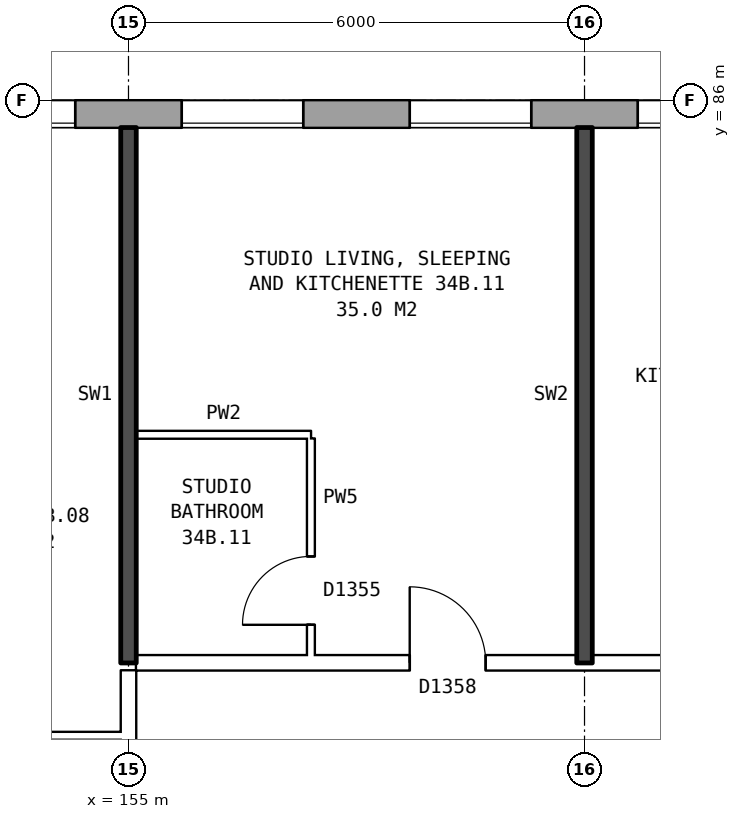
"""IFC4 building model, lengths in metres.
Left out: names, types, materials, properties, quantities, classifications, styles, units other than length and angle.
Written with IfcOpenShell. Run it as: python <this file> out.ifc"""

import sys

from ifc_helpers import new_model, si_unit, direction, frame, frame_2d, origin, place, context, subcontext, project, spatial, rectangle, extrude, element, fill, save


model = new_model("IFC4")
c1 = context("Model", 3, precision=1e-05, world=origin(), true_north=direction((0.0, 1.0)))
c2 = subcontext(c1, "Body", "Model", "MODEL_VIEW")
j1 = project(units=[si_unit("LENGTHUNIT", "METRE"), si_unit("PLANEANGLEUNIT", "RADIAN")], contexts=[c1])
p1 = place(None, origin())
s1 = spatial("IfcSite", under=j1, at=p1, CompositionType="ELEMENT")
p2 = place(p1, origin())
s2 = spatial("IfcBuilding", under=s1, at=p2, CompositionType="ELEMENT")
p3 = place(p2, frame((0.0, 0.0, 123.7)))
s3 = spatial("IfcBuildingStorey", under=s2, at=p3, CompositionType="ELEMENT", Elevation=123.7)
p4 = place(p3, frame((169.675, 85.82, 0.0), z_axis=(0.0, 0.0, 1.0), x_axis=(-1.0, 0.0, 0.0)))
e1 = element("IfcWall", 1, at=p4, inside=s3, PredefinedType="STANDARD", context=c2, shape_type="SweptSolid", body=[
    extrude(rectangle(XDim=35.601, YDim=0.36, at=frame_2d((17.8, 0.0))), origin(), (0.0, 0.0, 1.0), 2.85),
])
p5 = place(p4, frame((0.3, 0.0, 0.8)))
e2 = element("IfcOpeningElement", 2, at=p5, cuts=e1, PredefinedType="OPENING", context=c2, shape_type="SweptSolid", body=[
    extrude(rectangle(XDim=0.8, YDim=1.8, at=frame_2d((0.4, 0.9))), frame((0.0, 0.19, 0.0), z_axis=(0.0, -1.0, 0.0), x_axis=(1.0, 0.0, 0.0)), (0.0, 0.0, 1.0), 0.38),
])
p6 = place(p4, frame((3.125, 0.0, 0.8)))
e3 = element("IfcOpeningElement", 3, at=p6, cuts=e1, PredefinedType="OPENING", context=c2, shape_type="SweptSolid", body=[
    extrude(rectangle(XDim=0.8, YDim=0.9, at=frame_2d((0.4, 0.45))), frame((0.0, 0.19, 0.0), z_axis=(0.0, -1.0, 0.0), x_axis=(1.0, 0.0, 0.0)), (0.0, 0.0, 1.0), 0.38),
])
p7 = place(p4, frame((6.375, 0.0, 0.8)))
e4 = element("IfcOpeningElement", 4, at=p7, cuts=e1, PredefinedType="OPENING", context=c2, shape_type="SweptSolid", body=[
    extrude(rectangle(XDim=1.6, YDim=1.8, at=frame_2d((0.8, 0.9))), frame((0.0, 0.19, 0.0), z_axis=(0.0, -1.0, 0.0), x_axis=(1.0, 0.0, 0.0)), (0.0, 0.0, 1.0), 0.38),
])
p8 = place(p4, frame((9.375, 0.0, 0.8)))
e5 = element("IfcOpeningElement", 5, at=p8, cuts=e1, PredefinedType="OPENING", context=c2, shape_type="SweptSolid", body=[
    extrude(rectangle(XDim=1.6, YDim=1.8, at=frame_2d((0.8, 0.9))), frame((0.0, 0.19, 0.0), z_axis=(0.0, -1.0, 0.0), x_axis=(1.0, 0.0, 0.0)), (0.0, 0.0, 1.0), 0.38),
])
p9 = place(p4, frame((12.375, 0.0, 0.8)))
e6 = element("IfcOpeningElement", 6, at=p9, cuts=e1, PredefinedType="OPENING", context=c2, shape_type="SweptSolid", body=[
    extrude(rectangle(XDim=1.6, YDim=1.8, at=frame_2d((0.8, 0.9))), frame((0.0, 0.19, 0.0), z_axis=(0.0, -1.0, 0.0), x_axis=(1.0, 0.0, 0.0)), (0.0, 0.0, 1.0), 0.38),
])
p10 = place(p4, frame((15.375, 0.0, 0.8)))
e7 = element("IfcOpeningElement", 7, at=p10, cuts=e1, PredefinedType="OPENING", context=c2, shape_type="SweptSolid", body=[
    extrude(rectangle(XDim=1.6, YDim=1.8, at=frame_2d((0.8, 0.9))), frame((0.0, 0.19, 0.0), z_axis=(0.0, -1.0, 0.0), x_axis=(1.0, 0.0, 0.0)), (0.0, 0.0, 1.0), 0.38),
])
p11 = place(p4, frame((18.375, 0.0, 0.8)))
e8 = element("IfcOpeningElement", 8, at=p11, cuts=e1, PredefinedType="OPENING", context=c2, shape_type="SweptSolid", body=[
    extrude(rectangle(XDim=1.6, YDim=1.8, at=frame_2d((0.8, 0.9))), frame((0.0, 0.19, 0.0), z_axis=(0.0, -1.0, 0.0), x_axis=(1.0, 0.0, 0.0)), (0.0, 0.0, 1.0), 0.38),
])
p12 = place(p4, frame((21.375, 0.0, 0.8)))
e9 = element("IfcOpeningElement", 9, at=p12, cuts=e1, PredefinedType="OPENING", context=c2, shape_type="SweptSolid", body=[
    extrude(rectangle(XDim=1.6, YDim=1.8, at=frame_2d((0.8, 0.9))), frame((0.0, 0.19, 0.0), z_axis=(0.0, -1.0, 0.0), x_axis=(1.0, 0.0, 0.0)), (0.0, 0.0, 1.0), 0.38),
])
p13 = place(p4, frame((24.375, 0.0, 0.8)))
e10 = element("IfcOpeningElement", 10, at=p13, cuts=e1, PredefinedType="OPENING", context=c2, shape_type="SweptSolid", body=[
    extrude(rectangle(XDim=1.6, YDim=1.8, at=frame_2d((0.8, 0.9))), frame((0.0, 0.19, 0.0), z_axis=(0.0, -1.0, 0.0), x_axis=(1.0, 0.0, 0.0)), (0.0, 0.0, 1.0), 0.38),
])
p14 = place(p4, frame((27.375, 0.0, 0.8)))
e11 = element("IfcOpeningElement", 11, at=p14, cuts=e1, PredefinedType="OPENING", context=c2, shape_type="SweptSolid", body=[
    extrude(rectangle(XDim=1.6, YDim=1.8, at=frame_2d((0.8, 0.9))), frame((0.0, 0.19, 0.0), z_axis=(0.0, -1.0, 0.0), x_axis=(1.0, 0.0, 0.0)), (0.0, 0.0, 1.0), 0.38),
])
p15 = place(p4, frame((29.275, 0.0, 0.8)))
e12 = element("IfcOpeningElement", 12, at=p15, cuts=e1, PredefinedType="OPENING", context=c2, shape_type="SweptSolid", body=[
    extrude(rectangle(XDim=1.4, YDim=1.8, at=frame_2d((0.7, 0.9))), frame((0.0, 0.19, 0.0), z_axis=(0.0, -1.0, 0.0), x_axis=(1.0, 0.0, 0.0)), (0.0, 0.0, 1.0), 0.38),
])
p16 = place(p4, frame((33.525, 0.0, 1.7)))
e13 = element("IfcOpeningElement", 13, at=p16, cuts=e1, PredefinedType="OPENING", context=c2, shape_type="SweptSolid", body=[
    extrude(rectangle(XDim=0.6, YDim=0.9, at=frame_2d((0.3, 0.45))), frame((0.0, 0.19, 0.0), z_axis=(0.0, -1.0, 0.0), x_axis=(1.0, 0.0, 0.0)), (0.0, 0.0, 1.0), 0.38),
])
p17 = place(p4, frame((1.4, 0.0, 1.6)))
e14 = element("IfcOpeningElement", 14, at=p17, cuts=e1, PredefinedType="OPENING", context=c2, shape_type="SweptSolid", body=[
    extrude(rectangle(XDim=0.6, YDim=0.9, at=frame_2d((0.3, 0.45))), frame((0.0, 0.19, 0.0), z_axis=(0.0, -1.0, 0.0), x_axis=(1.0, 0.0, 0.0)), (0.0, 0.0, 1.0), 0.38),
])
p18 = place(p4, frame((4.225, 0.0, 0.8)))
e15 = element("IfcOpeningElement", 15, at=p18, cuts=e1, PredefinedType="OPENING", context=c2, shape_type="SweptSolid", body=[
    extrude(rectangle(XDim=1.6, YDim=1.8, at=frame_2d((0.8, 0.9))), frame((0.0, 0.19, 0.0), z_axis=(0.0, -1.0, 0.0), x_axis=(1.0, 0.0, 0.0)), (0.0, 0.0, 1.0), 0.38),
])
p19 = place(p4, frame((30.975, 0.0, 0.8)))
e16 = element("IfcOpeningElement", 16, at=p19, cuts=e1, PredefinedType="OPENING", context=c2, shape_type="SweptSolid", body=[
    extrude(rectangle(XDim=0.8, YDim=1.5, at=frame_2d((0.4, 0.75))), frame((0.0, 0.19, 0.0), z_axis=(0.0, -1.0, 0.0), x_axis=(1.0, 0.0, 0.0)), (0.0, 0.0, 1.0), 0.38),
])
p20 = place(p4, frame((34.425, 0.0, 0.8)))
e17 = element("IfcOpeningElement", 17, at=p20, cuts=e1, PredefinedType="OPENING", context=c2, shape_type="SweptSolid", body=[
    extrude(rectangle(XDim=0.8, YDim=1.8, at=frame_2d((0.4, 0.9))), frame((0.0, 0.19, 0.0), z_axis=(0.0, -1.0, 0.0), x_axis=(1.0, 0.0, 0.0)), (0.0, 0.0, 1.0), 0.38),
])
p21 = place(p3, frame((152.0, 77.64, 0.0), z_axis=(0.0, 0.0, 1.0), x_axis=(1.0, 0.0, 0.0)))
e18 = element("IfcWall", 18, at=p21, inside=s3, PredefinedType="PARTITIONING", context=c2, shape_type="SweptSolid", body=[
    extrude(rectangle(XDim=2.9, YDim=0.1, at=frame_2d((1.45, 0.0))), origin(), (0.0, 0.0, 1.0), 2.85),
])
p22 = place(p21, frame((1.0, 0.0, 0.0)))
e19 = element("IfcOpeningElement", 19, at=p22, cuts=e18, PredefinedType="OPENING", context=c2, shape_type="SweptSolid", body=[
    extrude(rectangle(XDim=0.9, YDim=2.1, at=frame_2d((0.45, 1.05))), frame((0.0, 0.06, 0.0), z_axis=(0.0, -1.0, 0.0), x_axis=(1.0, 0.0, 0.0)), (0.0, 0.0, 1.0), 0.12),
])
p23 = place(p3, frame((155.1, 78.6, 0.0), z_axis=(0.0, 0.0, 1.0), x_axis=(1.0, 0.0, 0.0)))
e20 = element("IfcWall", 20, at=p23, inside=s3, PredefinedType="PARTITIONING", context=c2, shape_type="SweptSolid", body=[
    extrude(rectangle(XDim=17.29, YDim=0.2, at=frame_2d((8.645, 0.0))), origin(), (0.0, 0.0, 1.0), 2.85),
])
p24 = place(p23, frame((3.6, 0.0, 0.0)))
e21 = element("IfcOpeningElement", 21, at=p24, cuts=e20, PredefinedType="OPENING", context=c2, shape_type="SweptSolid", body=[
    extrude(rectangle(XDim=1.0, YDim=2.1, at=frame_2d((0.5, 1.05))), frame((0.0, 0.11, 0.0), z_axis=(0.0, -1.0, 0.0), x_axis=(1.0, 0.0, 0.0)), (0.0, 0.0, 1.0), 0.22),
])
p25 = place(p23, frame((8.4, 0.0, 0.0)))
e22 = element("IfcOpeningElement", 22, at=p25, cuts=e20, PredefinedType="OPENING", context=c2, shape_type="SweptSolid", body=[
    extrude(rectangle(XDim=1.0, YDim=2.1, at=frame_2d((0.5, 1.05))), frame((0.0, 0.11, 0.0), z_axis=(0.0, -1.0, 0.0), x_axis=(1.0, 0.0, 0.0)), (0.0, 0.0, 1.0), 0.22),
])
p26 = place(p3, frame((155.1, 81.6, 0.0), z_axis=(0.0, 0.0, 1.0), x_axis=(1.0, 0.0, 0.0)))
e23 = element("IfcWall", 23, at=p26, inside=s3, PredefinedType="PARTITIONING", context=c2, shape_type="SweptSolid", body=[
    extrude(rectangle(XDim=2.3, YDim=0.1, at=frame_2d((1.15, 0.0))), origin(), (0.0, 0.0, 1.0), 2.85),
])
p27 = place(p3, frame((155.0, 76.3, 0.0), z_axis=(0.0, 0.0, 1.0), x_axis=(0.0, 1.0, 0.0)))
e24 = element("IfcWall", 24, at=p27, inside=s3, PredefinedType="PARTITIONING", context=c2, shape_type="SweptSolid", body=[
    extrude(rectangle(XDim=2.2, YDim=0.2, at=frame_2d((1.1, 0.0))), origin(), (0.0, 0.0, 1.0), 2.85),
])
p28 = place(p3, frame((155.0, 78.6, 0.0), z_axis=(0.0, 0.0, 1.0), x_axis=(0.0, 1.0, 0.0)))
e25 = element("IfcWall", 25, at=p28, inside=s3, PredefinedType="SOLIDWALL", context=c2, shape_type="SweptSolid", body=[
    extrude(rectangle(XDim=7.04, YDim=0.2, at=frame_2d((3.52, 0.0))), origin(), (0.0, 0.0, 1.0), 2.85),
])
p29 = place(p3, frame((157.4, 78.7, 0.0), z_axis=(0.0, 0.0, 1.0), x_axis=(0.0, 1.0, 0.0)))
e26 = element("IfcWall", 26, at=p29, inside=s3, PredefinedType="PARTITIONING", context=c2, shape_type="SweptSolid", body=[
    extrude(rectangle(XDim=2.85, YDim=0.1, at=frame_2d((1.425, 0.0))), origin(), (0.0, 0.0, 1.0), 2.85),
])
p30 = place(p29, frame((0.4, 0.0, 0.0)))
e27 = element("IfcOpeningElement", 27, at=p30, cuts=e26, PredefinedType="OPENING", context=c2, shape_type="SweptSolid", body=[
    extrude(rectangle(XDim=0.9, YDim=2.1, at=frame_2d((0.45, 1.05))), frame((0.0, 0.06, 0.0), z_axis=(0.0, -1.0, 0.0), x_axis=(1.0, 0.0, 0.0)), (0.0, 0.0, 1.0), 0.12),
])
p31 = place(p3, frame((161.0, 78.6, 0.0), z_axis=(0.0, 0.0, 1.0), x_axis=(0.0, 1.0, 0.0)))
e28 = element("IfcWall", 28, at=p31, inside=s3, PredefinedType="SOLIDWALL", context=c2, shape_type="SweptSolid", body=[
    extrude(rectangle(XDim=7.04, YDim=0.2, at=frame_2d((3.52, 0.0))), origin(), (0.0, 0.0, 1.0), 2.85),
])
p32 = place(p7, origin())
e29 = element("IfcWindow", 29, at=p32, inside=s3, PartitioningType="SINGLE_PANEL", PredefinedType="WINDOW", context=c2, shape_type="SweptSolid", body=[
    extrude(rectangle(XDim=1.6, YDim=1.8, at=frame_2d((0.8, 0.9))), frame((0.0, 0.15, 0.0), z_axis=(0.0, -1.0, 0.0), x_axis=(1.0, 0.0, 0.0)), (0.0, 0.0, 1.0), 0.06),
])
fill(e4, e29)
p33 = place(p8, origin())
e30 = element("IfcWindow", 30, at=p33, inside=s3, PartitioningType="SINGLE_PANEL", PredefinedType="WINDOW", context=c2, shape_type="SweptSolid", body=[
    extrude(rectangle(XDim=1.6, YDim=1.8, at=frame_2d((0.8, 0.9))), frame((0.0, 0.15, 0.0), z_axis=(0.0, -1.0, 0.0), x_axis=(1.0, 0.0, 0.0)), (0.0, 0.0, 1.0), 0.06),
])
fill(e5, e30)
p34 = place(p9, origin())
e31 = element("IfcWindow", 31, at=p34, inside=s3, PartitioningType="SINGLE_PANEL", PredefinedType="WINDOW", context=c2, shape_type="SweptSolid", body=[
    extrude(rectangle(XDim=1.6, YDim=1.8, at=frame_2d((0.8, 0.9))), frame((0.0, 0.15, 0.0), z_axis=(0.0, -1.0, 0.0), x_axis=(1.0, 0.0, 0.0)), (0.0, 0.0, 1.0), 0.06),
])
fill(e6, e31)
p35 = place(p10, origin())
e32 = element("IfcWindow", 32, at=p35, inside=s3, PartitioningType="SINGLE_PANEL", PredefinedType="WINDOW", context=c2, shape_type="SweptSolid", body=[
    extrude(rectangle(XDim=1.6, YDim=1.8, at=frame_2d((0.8, 0.9))), frame((0.0, 0.15, 0.0), z_axis=(0.0, -1.0, 0.0), x_axis=(1.0, 0.0, 0.0)), (0.0, 0.0, 1.0), 0.06),
])
fill(e7, e32)
p36 = place(p24, origin())
e33 = element("IfcDoor", 33, at=p36, inside=s3, OperationType="SINGLE_SWING_LEFT", PredefinedType="DOOR", context=c2, shape_type="SweptSolid", body=[
    extrude(rectangle(XDim=1.0, YDim=2.1, at=frame_2d((0.5, 1.05))), frame((0.0, 0.025, 0.0), z_axis=(0.0, -1.0, 0.0), x_axis=(1.0, 0.0, 0.0)), (0.0, 0.0, 1.0), 0.05),
])
fill(e21, e33)
p37 = place(p30, origin())
e34 = element("IfcDoor", 34, at=p37, inside=s3, OperationType="SINGLE_SWING_LEFT", PredefinedType="DOOR", context=c2, shape_type="SweptSolid", body=[
    extrude(rectangle(XDim=0.9, YDim=2.1, at=frame_2d((0.45, 1.05))), frame((0.0, 0.025, 0.0), z_axis=(0.0, -1.0, 0.0), x_axis=(1.0, 0.0, 0.0)), (0.0, 0.0, 1.0), 0.05),
])
fill(e27, e34)
save(model, sys.argv[1])
